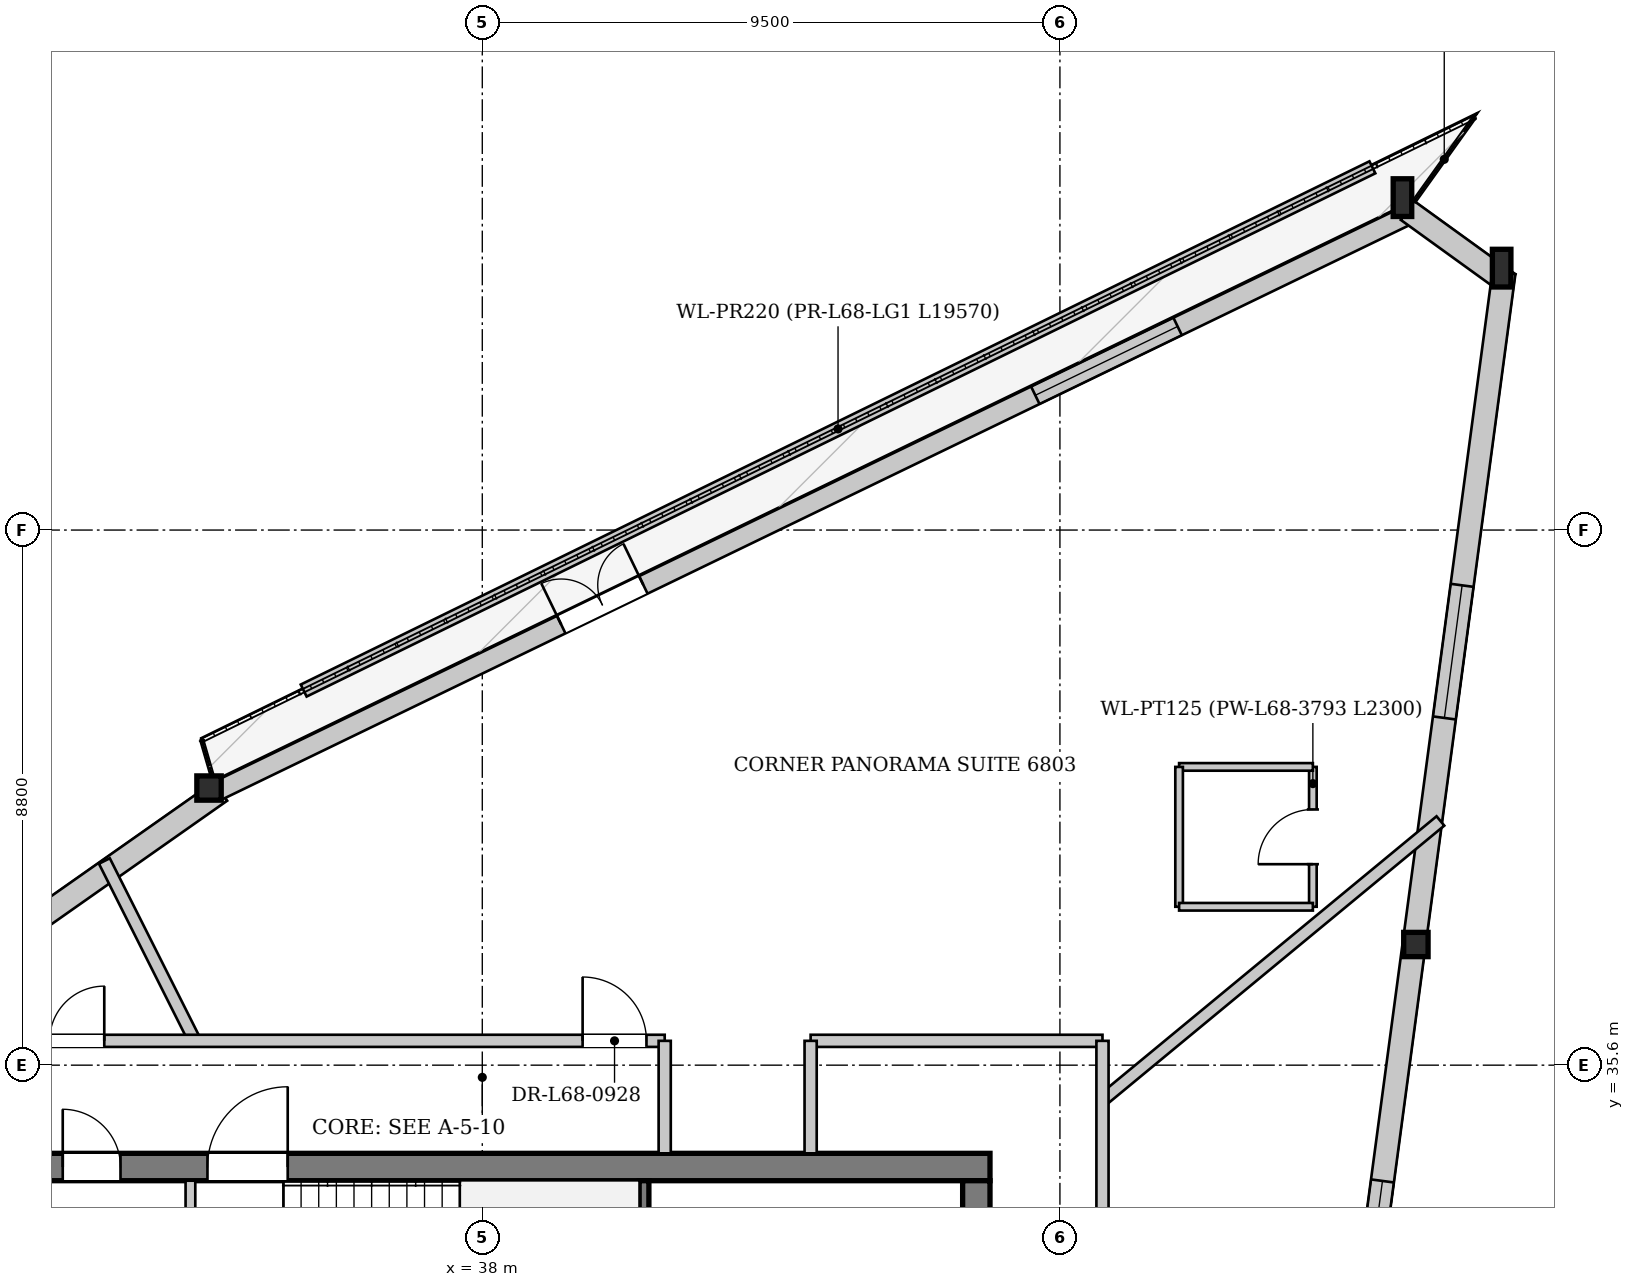
"""IFC4 building model, lengths in metres.
Left out: names, types, materials, properties, quantities, classifications, styles, units other than length and angle.
Written with IfcOpenShell. Run it as: python <this file> out.ifc"""

import sys

from ifc_helpers import new_model, si_unit, direction, frame, frame_2d, origin, origin_2d, place, context, subcontext, project, spatial, rectangle, i_section, extrude, source, transform, mapped, element, fill, save


model = new_model("IFC4")
c1 = context("Model", 3, precision=1e-05, world=origin(), true_north=direction((0.0, 1.0)))
c2 = subcontext(c1, "Body", "Model", "MODEL_VIEW")
j1 = project(units=[si_unit("LENGTHUNIT", "METRE"), si_unit("PLANEANGLEUNIT", "RADIAN")], contexts=[c1])
p1 = place(None, origin())
s1 = spatial("IfcSite", under=j1, at=p1, CompositionType="ELEMENT")
p2 = place(p1, origin())
s2 = spatial("IfcBuilding", under=s1, at=p2, CompositionType="ELEMENT")
p3 = place(p2, frame((0.0, 0.0, 256.1)))
s3 = spatial("IfcBuildingStorey", under=s2, at=p3, CompositionType="ELEMENT", Elevation=256.1)
m1 = source(origin(), c2, "Body", "SweptSolid", [
    extrude(i_section(OverallWidth=0.305, OverallDepth=0.62, WebThickness=0.021, FlangeThickness=0.04, at=origin_2d()), origin(), (0.0, 0.0, 1.0), 3.47),
])
p4 = place(p3, frame((54.991, 48.608, 0.0), z_axis=(-0.130297353121, 0.057198568082, 0.989823683076), x_axis=(-0.401959731094, -0.915657345615, 0.0)))
e1 = element("IfcColumn", 1, at=p4, inside=s3, PredefinedType="COLUMN", context=c2, shape_type="MappedRepresentation", body=[
    mapped(m1, transform((0.0, 0.0, 0.0), x_axis=(1.0, 0.0, 0.0), y_axis=(0.0, 1.0, 0.0), z_axis=(0.0, 0.0, 1.0), scale=1.0)),
])
m2 = source(origin(), c2, "Body", "SweptSolid", [
    extrude(i_section(OverallWidth=0.305, OverallDepth=0.62, WebThickness=0.021, FlangeThickness=0.04, at=origin_2d()), origin(), (0.0, 0.0, 1.0), 3.459),
])
p5 = place(p3, frame((53.329, 49.809, 0.0), z_axis=(-0.112863363899, 0.033597849416, 0.993042318134), x_axis=(-0.285312589615, -0.958434518476, 0.0)))
e2 = element("IfcColumn", 2, at=p5, inside=s3, PredefinedType="COLUMN", context=c2, shape_type="MappedRepresentation", body=[
    mapped(m2, transform((0.0, 0.0, 0.0), x_axis=(1.0, 0.0, 0.0), y_axis=(0.0, 1.0, 0.0), z_axis=(0.0, 0.0, 1.0), scale=1.0)),
])
m3 = source(origin(), c2, "Body", "SweptSolid", [
    extrude(i_section(OverallWidth=0.401, OverallDepth=0.399, WebThickness=0.022, FlangeThickness=0.034, at=origin_2d()), origin(), (0.0, 0.0, 1.0), 3.445),
])
p6 = place(p3, frame((33.586, 40.26, 0.0), z_axis=(-0.046494507313, -0.059393898061, 0.997151255158), x_axis=(0.787425680638, -0.616409602027, 0.0)))
e3 = element("IfcColumn", 3, at=p6, inside=s3, PredefinedType="COLUMN", context=c2, shape_type="MappedRepresentation", body=[
    mapped(m3, transform((0.0, 0.0, 0.0), x_axis=(1.0, 0.0, 0.0), y_axis=(0.0, 1.0, 0.0), z_axis=(0.0, 0.0, 1.0), scale=1.0)),
])
m4 = source(origin(), c2, "Body", "SweptSolid", [
    extrude(i_section(OverallWidth=0.401, OverallDepth=0.399, WebThickness=0.022, FlangeThickness=0.034, at=origin_2d()), origin(), (0.0, 0.0, 1.0), 3.454),
])
p7 = place(p3, frame((53.502, 37.478, 0.0), z_axis=(-0.085524705065, 0.061775696055, 0.994419070714), x_axis=(-0.585539474342, -0.810643894684, 0.0)))
e4 = element("IfcColumn", 4, at=p7, inside=s3, PredefinedType="COLUMN", context=c2, shape_type="MappedRepresentation", body=[
    mapped(m4, transform((0.0, 0.0, 0.0), x_axis=(1.0, 0.0, 0.0), y_axis=(0.0, 1.0, 0.0), z_axis=(0.0, 0.0, 1.0), scale=1.0)),
])
p8 = place(p3, frame((15.751, 27.495, 0.0), z_axis=(0.0, 0.0, 1.0), x_axis=(0.818194527571, 0.574941488373, 0.0)))
e5 = element("IfcWall", 5, at=p8, inside=s3, PredefinedType="SOLIDWALL", context=c2, shape_type="SweptSolid", body=[
    extrude(rectangle(XDim=21.931, YDim=0.38, at=frame_2d((10.965, 0.0))), origin(), (0.0, 0.0, 1.0), 2.872),
])
p9 = place(p8, frame((5.041, 0.0, 0.502)))
e6 = element("IfcOpeningElement", 6, at=p9, cuts=e5, PredefinedType="OPENING", context=c2, shape_type="SweptSolid", body=[
    extrude(rectangle(XDim=2.2, YDim=2.25, at=frame_2d((1.1, 1.125))), frame((0.0, 0.2, 0.0), z_axis=(0.0, -1.0, 0.0), x_axis=(1.0, 0.0, 0.0)), (0.0, 0.0, 1.0), 0.4),
])
p10 = place(p8, frame((15.79, 0.0, 0.502)))
e7 = element("IfcOpeningElement", 7, at=p10, cuts=e5, PredefinedType="OPENING", context=c2, shape_type="SweptSolid", body=[
    extrude(rectangle(XDim=2.2, YDim=2.25, at=frame_2d((1.1, 1.125))), frame((0.0, 0.2, 0.0), z_axis=(0.0, -1.0, 0.0), x_axis=(1.0, 0.0, 0.0)), (0.0, 0.0, 1.0), 0.4),
])
p11 = place(p3, frame((33.656, 40.116, 0.0), z_axis=(0.0, 0.0, 1.0), x_axis=(0.900227808342, 0.43541921534, 0.0)))
e8 = element("IfcWall", 8, at=p11, inside=s3, PredefinedType="SOLIDWALL", context=c2, shape_type="SweptSolid", body=[
    extrude(rectangle(XDim=21.931, YDim=0.32, at=frame_2d((10.965, 0.0))), origin(), (0.0, 0.0, 1.0), 2.872),
])
p12 = place(p11, frame((6.268, 0.0, 0.0)))
e9 = element("IfcOpeningElement", 9, at=p12, cuts=e8, PredefinedType="OPENING", context=c2, shape_type="SweptSolid", body=[
    extrude(rectangle(XDim=1.5, YDim=2.3, at=frame_2d((0.75, 1.15))), frame((0.0, 0.17, 0.0), z_axis=(0.0, -1.0, 0.0), x_axis=(1.0, 0.0, 0.0)), (0.0, 0.0, 1.0), 0.34),
])
p13 = place(p11, frame((14.929, 0.0, 0.402)))
e10 = element("IfcOpeningElement", 10, at=p13, cuts=e8, PredefinedType="OPENING", context=c2, shape_type="SweptSolid", body=[
    extrude(rectangle(XDim=2.6, YDim=2.35, at=frame_2d((1.3, 1.175))), frame((0.0, 0.17, 0.0), z_axis=(0.0, -1.0, 0.0), x_axis=(1.0, 0.0, 0.0)), (0.0, 0.0, 1.0), 0.34),
])
p14 = place(p3, frame((53.217, 49.655, 0.0), z_axis=(0.0, 0.0, 1.0), x_axis=(0.810559910153, -0.585655728267, 0.0)))
e11 = element("IfcWall", 11, at=p14, inside=s3, PredefinedType="SOLIDWALL", context=c2, shape_type="SweptSolid", body=[
    extrude(rectangle(XDim=2.051, YDim=0.38, at=frame_2d((1.025, 0.0))), origin(), (0.0, 0.0, 1.0), 2.872),
])
p15 = place(p3, frame((54.802, 48.633, 0.0), z_axis=(0.0, 0.0, 1.0), x_axis=(-0.132568870199, -0.991173796392, 0.0)))
e12 = element("IfcWall", 12, at=p15, inside=s3, PredefinedType="SOLIDWALL", context=c2, shape_type="SweptSolid", body=[
    extrude(rectangle(XDim=22.458, YDim=0.38, at=frame_2d((11.229, 0.0))), origin(), (0.0, 0.0, 1.0), 2.872),
])
p16 = place(p15, frame((5.188, 0.0, 0.502)))
e13 = element("IfcOpeningElement", 13, at=p16, cuts=e12, PredefinedType="OPENING", context=c2, shape_type="SweptSolid", body=[
    extrude(rectangle(XDim=2.2, YDim=2.25, at=frame_2d((1.1, 1.125))), frame((0.0, 0.2, 0.0), z_axis=(0.0, -1.0, 0.0), x_axis=(1.0, 0.0, 0.0)), (0.0, 0.0, 1.0), 0.4),
])
p17 = place(p15, frame((15.07, 0.0, 0.502)))
e14 = element("IfcOpeningElement", 14, at=p17, cuts=e12, PredefinedType="OPENING", context=c2, shape_type="SweptSolid", body=[
    extrude(rectangle(XDim=2.2, YDim=2.25, at=frame_2d((1.1, 1.125))), frame((0.0, 0.2, 0.0), z_axis=(0.0, -1.0, 0.0), x_axis=(1.0, 0.0, 0.0)), (0.0, 0.0, 1.0), 0.4),
])
p18 = place(p3, frame((52.639, 50.365, 0.0), z_axis=(0.0, 0.0, 1.0), x_axis=(-0.89814586726, -0.439697624652, 0.0)))
e15 = element("IfcWall", 15, at=p18, inside=s3, PredefinedType="PARAPET", context=c2, shape_type="SweptSolid", body=[
    extrude(rectangle(XDim=19.57, YDim=0.22, at=frame_2d((9.785, 0.0))), origin(), (0.0, 0.0, 1.0), 0.3),
])
p19 = place(p3, frame((29.65, 33.925, 0.0), z_axis=(0.0, 0.0, 1.0), x_axis=(1.0, 0.0, 0.0)))
e16 = element("IfcWall", 16, at=p19, inside=s3, PredefinedType="SHEAR", context=c2, shape_type="SweptSolid", body=[
    extrude(rectangle(XDim=16.7, YDim=0.45, at=frame_2d((8.35, 0.0))), origin(), (0.0, 0.0, 1.0), 3.38),
])
p20 = place(p19, frame((1.45, 0.0, 0.0)))
e17 = element("IfcOpeningElement", 17, at=p20, cuts=e16, PredefinedType="OPENING", context=c2, shape_type="SweptSolid", body=[
    extrude(rectangle(XDim=0.95, YDim=2.1, at=frame_2d((0.475, 1.05))), frame((0.0, 0.235, 0.0), z_axis=(0.0, -1.0, 0.0), x_axis=(1.0, 0.0, 0.0)), (0.0, 0.0, 1.0), 0.47),
])
p21 = place(p19, frame((3.83, 0.0, 0.0)))
e18 = element("IfcOpeningElement", 18, at=p21, cuts=e16, PredefinedType="OPENING", context=c2, shape_type="SweptSolid", body=[
    extrude(rectangle(XDim=1.32, YDim=2.2, at=frame_2d((0.66, 1.1))), frame((0.0, 0.235, 0.0), z_axis=(0.0, -1.0, 0.0), x_axis=(1.0, 0.0, 0.0)), (0.0, 0.0, 1.0), 0.47),
])
p22 = place(p3, frame((46.125, 33.7, 0.0), z_axis=(0.0, 0.0, 1.0), x_axis=(0.0, -1.0, 0.0)))
e19 = element("IfcWall", 19, at=p22, inside=s3, PredefinedType="SHEAR", context=c2, shape_type="SweptSolid", body=[
    extrude(rectangle(XDim=14.2, YDim=0.45, at=frame_2d((7.1, 0.0))), origin(), (0.0, 0.0, 1.0), 3.38),
])
p23 = place(p22, frame((5.18, 0.0, 0.0)))
e20 = element("IfcOpeningElement", 20, at=p23, cuts=e19, PredefinedType="OPENING", context=c2, shape_type="SweptSolid", body=[
    extrude(rectangle(XDim=1.6, YDim=2.2, at=frame_2d((0.8, 1.1))), frame((0.0, 0.235, 0.0), z_axis=(0.0, -1.0, 0.0), x_axis=(1.0, 0.0, 0.0)), (0.0, 0.0, 1.0), 0.47),
])
p24 = place(p22, frame((2.05, 0.0, 0.0)))
e21 = element("IfcOpeningElement", 21, at=p24, cuts=e19, PredefinedType="OPENING", context=c2, shape_type="SweptSolid", body=[
    extrude(rectangle(XDim=0.95, YDim=2.1, at=frame_2d((0.475, 1.05))), frame((0.0, 0.235, 0.0), z_axis=(0.0, -1.0, 0.0), x_axis=(1.0, 0.0, 0.0)), (0.0, 0.0, 1.0), 0.47),
])
p25 = place(p3, frame((40.66, 30.6, 0.0), z_axis=(0.0, 0.0, 1.0), x_axis=(0.0, 1.0, 0.0)))
e22 = element("IfcWall", 22, at=p25, inside=s3, PredefinedType="PARTITIONING", context=c2, shape_type="SweptSolid", body=[
    extrude(rectangle(XDim=3.1, YDim=0.16, at=frame_2d((1.55, 0.0))), origin(), (0.0, 0.0, 1.0), 3.38),
])
p26 = place(p3, frame((33.2, 28.44, 0.0), z_axis=(0.0, 0.0, 1.0), x_axis=(0.0, 1.0, 0.0)))
e23 = element("IfcWall", 23, at=p26, inside=s3, PredefinedType="PARTITIONING", context=c2, shape_type="SweptSolid", body=[
    extrude(rectangle(XDim=5.26, YDim=0.16, at=frame_2d((2.63, 0.0))), origin(), (0.0, 0.0, 1.0), 3.38),
])
p27 = place(p3, frame((48.2, 35.025, 0.0), z_axis=(0.0, 0.0, 1.0), x_axis=(0.77099284028, 0.636843811493, 0.0)))
e24 = element("IfcWall", 24, at=p27, inside=s3, PredefinedType="PARTITIONING", context=c2, shape_type="SweptSolid", body=[
    extrude(rectangle(XDim=7.209, YDim=0.2, at=frame_2d((3.604, 0.0))), origin(), (0.0, 0.0, 1.0), 3.38),
])
p28 = place(p3, frame((33.272, 36.0, 0.0), z_axis=(0.0, 0.0, 1.0), x_axis=(-0.449277368576, 0.893392324841, 0.0)))
e25 = element("IfcWall", 25, at=p28, inside=s3, PredefinedType="PARTITIONING", context=c2, shape_type="SweptSolid", body=[
    extrude(rectangle(XDim=3.311, YDim=0.2, at=frame_2d((1.655, 0.0))), origin(), (0.0, 0.0, 1.0), 3.38),
])
p29 = place(p3, frame((51.66, 38.205, 0.0), z_axis=(0.0, 0.0, 1.0), x_axis=(0.0, 1.0, 0.0)))
e26 = element("IfcWall", 26, at=p29, inside=s3, PredefinedType="PARTITIONING", context=c2, shape_type="SweptSolid", body=[
    extrude(rectangle(XDim=2.3, YDim=0.125, at=frame_2d((1.15, 0.0))), origin(), (0.0, 0.0, 1.0), 3.38),
])
p30 = place(p29, frame((0.7, 0.0, 0.0)))
e27 = element("IfcOpeningElement", 27, at=p30, cuts=e26, PredefinedType="OPENING", context=c2, shape_type="SweptSolid", body=[
    extrude(rectangle(XDim=0.9, YDim=2.1, at=frame_2d((0.45, 1.05))), frame((0.0, 0.073, 0.0), z_axis=(0.0, -1.0, 0.0), x_axis=(1.0, 0.0, 0.0)), (0.0, 0.0, 1.0), 0.145),
])
p31 = place(p3, frame((51.66, 40.505, 0.0), z_axis=(0.0, 0.0, 1.0), x_axis=(-1.0, 0.0, 0.0)))
e28 = element("IfcWall", 28, at=p31, inside=s3, PredefinedType="PARTITIONING", context=c2, shape_type="SweptSolid", body=[
    extrude(rectangle(XDim=2.2, YDim=0.125, at=frame_2d((1.1, 0.0))), origin(), (0.0, 0.0, 1.0), 3.38),
])
p32 = place(p3, frame((49.46, 40.505, 0.0), z_axis=(0.0, 0.0, 1.0), x_axis=(0.0, -1.0, 0.0)))
e29 = element("IfcWall", 29, at=p32, inside=s3, PredefinedType="PARTITIONING", context=c2, shape_type="SweptSolid", body=[
    extrude(rectangle(XDim=2.3, YDim=0.125, at=frame_2d((1.15, 0.0))), origin(), (0.0, 0.0, 1.0), 3.38),
])
p33 = place(p3, frame((49.46, 38.205, 0.0), z_axis=(0.0, 0.0, 1.0), x_axis=(1.0, 0.0, 0.0)))
e30 = element("IfcWall", 30, at=p33, inside=s3, PredefinedType="PARTITIONING", context=c2, shape_type="SweptSolid", body=[
    extrude(rectangle(XDim=2.2, YDim=0.125, at=frame_2d((1.1, 0.0))), origin(), (0.0, 0.0, 1.0), 3.38),
])
p34 = place(p3, frame((27.8, 36.0, 0.0), z_axis=(0.0, 0.0, 1.0), x_axis=(1.0, 0.0, 0.0)))
e31 = element("IfcWall", 31, at=p34, inside=s3, PredefinedType="PARTITIONING", context=c2, shape_type="SweptSolid", body=[
    extrude(rectangle(XDim=13.2, YDim=0.2, at=frame_2d((6.6, 0.0))), origin(), (0.0, 0.0, 1.0), 3.38),
])
p35 = place(p34, frame((11.85, 0.0, 0.0)))
e32 = element("IfcOpeningElement", 32, at=p35, cuts=e31, PredefinedType="OPENING", context=c2, shape_type="SweptSolid", body=[
    extrude(rectangle(XDim=1.05, YDim=2.2, at=frame_2d((0.525, 1.1))), frame((0.0, 0.11, 0.0), z_axis=(0.0, -1.0, 0.0), x_axis=(1.0, 0.0, 0.0)), (0.0, 0.0, 1.0), 0.22),
])
p36 = place(p34, frame((3.083, 0.0, 0.0)))
e33 = element("IfcOpeningElement", 33, at=p36, cuts=e31, PredefinedType="OPENING", context=c2, shape_type="SweptSolid", body=[
    extrude(rectangle(XDim=0.9, YDim=2.1, at=frame_2d((0.45, 1.05))), frame((0.0, 0.11, 0.0), z_axis=(0.0, -1.0, 0.0), x_axis=(1.0, 0.0, 0.0)), (0.0, 0.0, 1.0), 0.22),
])
p37 = place(p3, frame((41.0, 34.15, 0.0), z_axis=(0.0, 0.0, 1.0), x_axis=(0.0, 1.0, 0.0)))
e34 = element("IfcWall", 34, at=p37, inside=s3, PredefinedType="PARTITIONING", context=c2, shape_type="SweptSolid", body=[
    extrude(rectangle(XDim=1.85, YDim=0.2, at=frame_2d((0.925, 0.0))), origin(), (0.0, 0.0, 1.0), 3.38),
])
p38 = place(p3, frame((43.4, 36.0, 0.0), z_axis=(0.0, 0.0, 1.0), x_axis=(1.0, 0.0, 0.0)))
e35 = element("IfcWall", 35, at=p38, inside=s3, PredefinedType="PARTITIONING", context=c2, shape_type="SweptSolid", body=[
    extrude(rectangle(XDim=4.8, YDim=0.2, at=frame_2d((2.4, 0.0))), origin(), (0.0, 0.0, 1.0), 3.38),
])
p39 = place(p3, frame((43.4, 34.15, 0.0), z_axis=(0.0, 0.0, 1.0), x_axis=(0.0, 1.0, 0.0)))
e36 = element("IfcWall", 36, at=p39, inside=s3, PredefinedType="PARTITIONING", context=c2, shape_type="SweptSolid", body=[
    extrude(rectangle(XDim=1.85, YDim=0.2, at=frame_2d((0.925, 0.0))), origin(), (0.0, 0.0, 1.0), 3.055),
])
p40 = place(p3, frame((48.2, 17.2, 0.0), z_axis=(0.0, 0.0, 1.0), x_axis=(0.0, 1.0, 0.0)))
e37 = element("IfcWall", 37, at=p40, inside=s3, PredefinedType="PARTITIONING", context=c2, shape_type="SweptSolid", body=[
    extrude(rectangle(XDim=18.8, YDim=0.2, at=frame_2d((9.4, 0.0))), origin(), (0.0, 0.0, 1.0), 3.065),
])
p41 = place(p40, frame((4.085, 0.0, 0.0)))
e38 = element("IfcOpeningElement", 38, at=p41, cuts=e37, PredefinedType="OPENING", context=c2, shape_type="SweptSolid", body=[
    extrude(rectangle(XDim=1.05, YDim=2.2, at=frame_2d((0.525, 1.1))), frame((0.0, 0.11, 0.0), z_axis=(0.0, -1.0, 0.0), x_axis=(1.0, 0.0, 0.0)), (0.0, 0.0, 1.0), 0.22),
])
m5 = source(origin(), c2, "Body", "SweptSolid", [
    extrude(rectangle(XDim=1.5, YDim=2.3, at=frame_2d((0.75, 1.15))), frame((0.0, 0.025, 0.0), z_axis=(0.0, -1.0, 0.0), x_axis=(1.0, 0.0, 0.0)), (0.0, 0.0, 1.0), 0.05),
])
p42 = place(p12, origin())
e39 = element("IfcDoor", 39, at=p42, inside=s3, OperationType="DOUBLE_DOOR_SINGLE_SWING", PredefinedType="DOOR", context=c2, shape_type="MappedRepresentation", body=[
    mapped(m5, transform((0.0, 0.0, 0.0), x_axis=(1.0, 0.0, 0.0), y_axis=(0.0, 1.0, 0.0), z_axis=(0.0, 0.0, 1.0), scale=1.0)),
])
fill(e9, e39)
m6 = source(origin(), c2, "Body", "SweptSolid", [
    extrude(rectangle(XDim=2.6, YDim=2.35, at=frame_2d((1.3, 1.175))), frame((0.0, 0.03, 0.0), z_axis=(0.0, -1.0, 0.0), x_axis=(1.0, 0.0, 0.0)), (0.0, 0.0, 1.0), 0.06),
])
p43 = place(p13, origin())
e40 = element("IfcWindow", 40, at=p43, inside=s3, PartitioningType="SINGLE_PANEL", PredefinedType="WINDOW", context=c2, shape_type="MappedRepresentation", body=[
    mapped(m6, transform((0.0, 0.0, 0.0), x_axis=(1.0, 0.0, 0.0), y_axis=(0.0, 1.0, 0.0), z_axis=(0.0, 0.0, 1.0), scale=1.0)),
])
fill(e10, e40)
m7 = source(origin(), c2, "Body", "SweptSolid", [
    extrude(rectangle(XDim=2.2, YDim=2.25, at=frame_2d((1.1, 1.125))), frame((0.0, 0.03, 0.0), z_axis=(0.0, -1.0, 0.0), x_axis=(1.0, 0.0, 0.0)), (0.0, 0.0, 1.0), 0.06),
])
p44 = place(p16, origin())
e41 = element("IfcWindow", 41, at=p44, inside=s3, PartitioningType="SINGLE_PANEL", PredefinedType="WINDOW", context=c2, shape_type="MappedRepresentation", body=[
    mapped(m7, transform((0.0, 0.0, 0.0), x_axis=(1.0, 0.0, 0.0), y_axis=(0.0, 1.0, 0.0), z_axis=(0.0, 0.0, 1.0), scale=1.0)),
])
fill(e13, e41)
p45 = place(p17, origin())
e42 = element("IfcWindow", 42, at=p45, inside=s3, PartitioningType="SINGLE_PANEL", PredefinedType="WINDOW", context=c2, shape_type="MappedRepresentation", body=[
    mapped(m7, transform((0.0, 0.0, 0.0), x_axis=(1.0, 0.0, 0.0), y_axis=(0.0, 1.0, 0.0), z_axis=(0.0, 0.0, 1.0), scale=1.0)),
])
fill(e14, e42)
m8 = source(origin(), c2, "Body", "SweptSolid", [
    extrude(rectangle(XDim=0.95, YDim=2.1, at=frame_2d((0.475, 1.05))), frame((0.0, 0.025, 0.0), z_axis=(0.0, -1.0, 0.0), x_axis=(1.0, 0.0, 0.0)), (0.0, 0.0, 1.0), 0.05),
])
p46 = place(p20, origin())
e43 = element("IfcDoor", 43, at=p46, inside=s3, OperationType="SINGLE_SWING_LEFT", PredefinedType="DOOR", context=c2, shape_type="MappedRepresentation", body=[
    mapped(m8, transform((0.0, 0.0, 0.0), x_axis=(1.0, 0.0, 0.0), y_axis=(0.0, 1.0, 0.0), z_axis=(0.0, 0.0, 1.0), scale=1.0)),
])
fill(e17, e43)
m9 = source(origin(), c2, "Body", "SweptSolid", [
    extrude(rectangle(XDim=1.32, YDim=2.2, at=frame_2d((0.66, 1.1))), frame((0.0, 0.025, 0.0), z_axis=(0.0, -1.0, 0.0), x_axis=(1.0, 0.0, 0.0)), (0.0, 0.0, 1.0), 0.05),
])
p47 = place(p21, origin())
e44 = element("IfcDoor", 44, at=p47, inside=s3, OperationType="SINGLE_SWING_RIGHT", PredefinedType="DOOR", context=c2, shape_type="MappedRepresentation", body=[
    mapped(m9, transform((0.0, 0.0, 0.0), x_axis=(1.0, 0.0, 0.0), y_axis=(0.0, 1.0, 0.0), z_axis=(0.0, 0.0, 1.0), scale=1.0)),
])
fill(e18, e44)
m10 = source(origin(), c2, "Body", "SweptSolid", [
    extrude(rectangle(XDim=0.9, YDim=2.1, at=frame_2d((0.45, 1.05))), frame((0.0, 0.025, 0.0), z_axis=(0.0, -1.0, 0.0), x_axis=(1.0, 0.0, 0.0)), (0.0, 0.0, 1.0), 0.05),
])
p48 = place(p30, origin())
e45 = element("IfcDoor", 45, at=p48, inside=s3, OperationType="SINGLE_SWING_LEFT", PredefinedType="DOOR", context=c2, shape_type="MappedRepresentation", body=[
    mapped(m10, transform((0.0, 0.0, 0.0), x_axis=(1.0, 0.0, 0.0), y_axis=(0.0, 1.0, 0.0), z_axis=(0.0, 0.0, 1.0), scale=1.0)),
])
fill(e27, e45)
m11 = source(origin(), c2, "Body", "SweptSolid", [
    extrude(rectangle(XDim=1.05, YDim=2.2, at=frame_2d((0.525, 1.1))), frame((0.0, 0.025, 0.0), z_axis=(0.0, -1.0, 0.0), x_axis=(1.0, 0.0, 0.0)), (0.0, 0.0, 1.0), 0.05),
])
p49 = place(p35, origin())
e46 = element("IfcDoor", 46, at=p49, inside=s3, OperationType="SINGLE_SWING_LEFT", PredefinedType="DOOR", context=c2, shape_type="MappedRepresentation", body=[
    mapped(m11, transform((0.0, 0.0, 0.0), x_axis=(1.0, 0.0, 0.0), y_axis=(0.0, 1.0, 0.0), z_axis=(0.0, 0.0, 1.0), scale=1.0)),
])
fill(e32, e46)
p50 = place(p36, origin())
e47 = element("IfcDoor", 47, at=p50, inside=s3, OperationType="SINGLE_SWING_RIGHT", PredefinedType="DOOR", context=c2, shape_type="MappedRepresentation", body=[
    mapped(m10, transform((0.0, 0.0, 0.0), x_axis=(1.0, 0.0, 0.0), y_axis=(0.0, 1.0, 0.0), z_axis=(0.0, 0.0, 1.0), scale=1.0)),
])
fill(e33, e47)
save(model, sys.argv[1])
